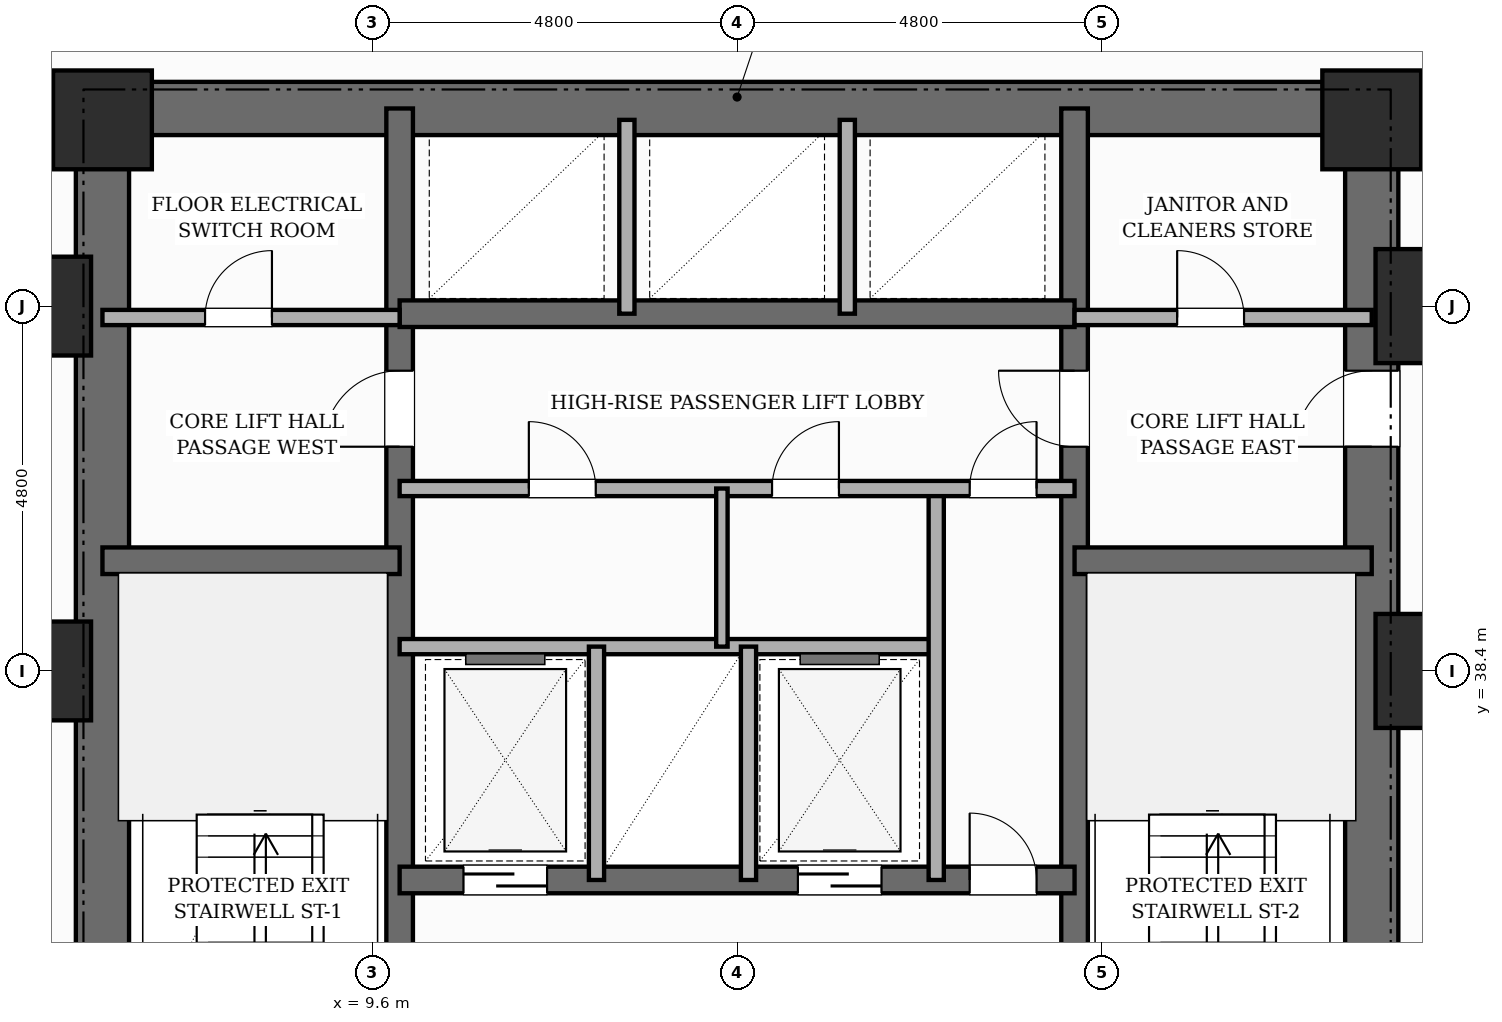
"""IFC4 building model, lengths in metres.
Left out: names, types, materials, properties, quantities, classifications, styles, units other than length and angle.
Written with IfcOpenShell. Run it as: python <this file> out.ifc"""

import sys

from ifc_helpers import new_model, si_unit, direction, frame, frame_2d, origin, origin_2d, place, context, subcontext, project, spatial, rectangle, extrude, element, fill, save


model = new_model("IFC4")
c1 = context("Model", 3, precision=1e-05, world=origin(), true_north=direction((0.0, 1.0)))
c2 = subcontext(c1, "Body", "Model", "MODEL_VIEW")
j1 = project(units=[si_unit("LENGTHUNIT", "METRE"), si_unit("PLANEANGLEUNIT", "RADIAN")], contexts=[c1])
p1 = place(None, origin())
s1 = spatial("IfcSite", under=j1, at=p1, CompositionType="ELEMENT")
p2 = place(p1, origin())
s2 = spatial("IfcBuilding", under=s1, at=p2, CompositionType="ELEMENT")
p3 = place(p2, frame((0.0, 0.0, 5.2)))
s3 = spatial("IfcBuildingStorey", under=s2, at=p3, CompositionType="ELEMENT", Elevation=5.2)
p4 = place(p3, frame((6.05, 30.55, 0.0), z_axis=(0.0, 0.0, 1.0), x_axis=(0.0, 1.0, 0.0)))
e1 = element("IfcWall", 1, at=p4, inside=s3, PredefinedType="SHEAR", context=c2, shape_type="SweptSolid", body=[
    extrude(rectangle(XDim=15.6, YDim=0.7, at=frame_2d((7.8, 0.0))), origin(), (0.0, 0.0, 1.0), 4.8),
])
p5 = place(p3, frame((22.75, 30.55, 0.0), z_axis=(0.0, 0.0, 1.0), x_axis=(0.0, 1.0, 0.0)))
e2 = element("IfcWall", 2, at=p5, inside=s3, PredefinedType="SHEAR", context=c2, shape_type="SweptSolid", body=[
    extrude(rectangle(XDim=15.6, YDim=0.7, at=frame_2d((7.8, 0.0))), origin(), (0.0, 0.0, 1.0), 4.8),
])
p6 = place(p5, frame((10.8, 0.0, 0.0)))
e3 = element("IfcOpeningElement", 3, at=p6, cuts=e2, PredefinedType="OPENING", context=c2, shape_type="SweptSolid", body=[
    extrude(rectangle(XDim=1.0, YDim=2.15, at=frame_2d((0.5, 1.075))), frame((0.0, 0.36, 0.0), z_axis=(0.0, -1.0, 0.0), x_axis=(1.0, 0.0, 0.0)), (0.0, 0.0, 1.0), 0.72),
])
p7 = place(p3, frame((6.05, 45.8, 0.0), z_axis=(0.0, 0.0, 1.0), x_axis=(1.0, 0.0, 0.0)))
e4 = element("IfcWall", 4, at=p7, inside=s3, PredefinedType="SHEAR", context=c2, shape_type="SweptSolid", body=[
    extrude(rectangle(XDim=16.7, YDim=0.7, at=frame_2d((8.35, 0.0))), origin(), (0.0, 0.0, 1.0), 4.8),
])
p8 = place(p3, frame((9.96, 30.9, 0.0), z_axis=(0.0, 0.0, 1.0), x_axis=(0.0, 1.0, 0.0)))
e5 = element("IfcWall", 5, at=p8, inside=s3, PredefinedType="SHEAR", context=c2, shape_type="SweptSolid", body=[
    extrude(rectangle(XDim=14.9, YDim=0.35, at=frame_2d((7.45, 0.0))), origin(), (0.0, 0.0, 1.0), 4.8),
])
p9 = place(p8, frame((0.65, 0.0, 0.0)))
e6 = element("IfcOpeningElement", 6, at=p9, cuts=e5, PredefinedType="OPENING", context=c2, shape_type="SweptSolid", body=[
    extrude(rectangle(XDim=0.95, YDim=2.1, at=frame_2d((0.475, 1.05))), frame((0.0, 0.185, 0.0), z_axis=(0.0, -1.0, 0.0), x_axis=(1.0, 0.0, 0.0)), (0.0, 0.0, 1.0), 0.37),
])
p10 = place(p8, frame((10.45, 0.0, 0.0)))
e7 = element("IfcOpeningElement", 7, at=p10, cuts=e5, PredefinedType="OPENING", context=c2, shape_type="SweptSolid", body=[
    extrude(rectangle(XDim=1.0, YDim=2.15, at=frame_2d((0.5, 1.075))), frame((0.0, 0.185, 0.0), z_axis=(0.0, -1.0, 0.0), x_axis=(1.0, 0.0, 0.0)), (0.0, 0.0, 1.0), 0.37),
])
p11 = place(p3, frame((18.84, 30.9, 0.0), z_axis=(0.0, 0.0, 1.0), x_axis=(0.0, 1.0, 0.0)))
e8 = element("IfcWall", 8, at=p11, inside=s3, PredefinedType="SHEAR", context=c2, shape_type="SweptSolid", body=[
    extrude(rectangle(XDim=14.9, YDim=0.35, at=frame_2d((7.45, 0.0))), origin(), (0.0, 0.0, 1.0), 4.8),
])
p12 = place(p11, frame((0.65, 0.0, 0.0)))
e9 = element("IfcOpeningElement", 9, at=p12, cuts=e8, PredefinedType="OPENING", context=c2, shape_type="SweptSolid", body=[
    extrude(rectangle(XDim=0.95, YDim=2.1, at=frame_2d((0.475, 1.05))), frame((0.0, 0.185, 0.0), z_axis=(0.0, -1.0, 0.0), x_axis=(1.0, 0.0, 0.0)), (0.0, 0.0, 1.0), 0.37),
])
p13 = place(p11, frame((10.45, 0.0, 0.0)))
e10 = element("IfcOpeningElement", 10, at=p13, cuts=e8, PredefinedType="OPENING", context=c2, shape_type="SweptSolid", body=[
    extrude(rectangle(XDim=1.0, YDim=2.15, at=frame_2d((0.5, 1.075))), frame((0.0, 0.185, 0.0), z_axis=(0.0, -1.0, 0.0), x_axis=(1.0, 0.0, 0.0)), (0.0, 0.0, 1.0), 0.37),
])
for number, where, z_axis, x_axis in (
    (11, (6.05, 39.85, 0.0), (0.0, 0.0, 1.0), (1.0, 0.0, 0.0)),
    (12, (18.84, 39.85, 0.0), (0.0, 0.0, 1.0), (1.0, 0.0, 0.0)),
):
    element("IfcWall", number, at=place(p3, frame(where, z_axis=z_axis, x_axis=x_axis)), inside=s3, PredefinedType="SHEAR", context=c2, shape_type="SweptSolid", body=[
        extrude(rectangle(XDim=3.91, YDim=0.35, at=frame_2d((1.955, 0.0))), origin(), (0.0, 0.0, 1.0), 4.8),
    ])
p14 = place(p3, frame((9.96, 35.65, 0.0), z_axis=(0.0, 0.0, 1.0), x_axis=(1.0, 0.0, 0.0)))
e13 = element("IfcWall", 13, at=p14, inside=s3, PredefinedType="SHEAR", context=c2, shape_type="SweptSolid", body=[
    extrude(rectangle(XDim=8.88, YDim=0.35, at=frame_2d((4.44, 0.0))), origin(), (0.0, 0.0, 1.0), 4.8),
])
p15 = place(p14, frame((0.84, 0.0, 0.0)))
e14 = element("IfcOpeningElement", 14, at=p15, cuts=e13, PredefinedType="OPENING", context=c2, shape_type="SweptSolid", body=[
    extrude(rectangle(XDim=1.1, YDim=2.15, at=frame_2d((0.55, 1.075))), frame((0.0, 0.185, 0.0), z_axis=(0.0, -1.0, 0.0), x_axis=(1.0, 0.0, 0.0)), (0.0, 0.0, 1.0), 0.37),
])
p16 = place(p14, frame((5.24, 0.0, 0.0)))
e15 = element("IfcOpeningElement", 15, at=p16, cuts=e13, PredefinedType="OPENING", context=c2, shape_type="SweptSolid", body=[
    extrude(rectangle(XDim=1.1, YDim=2.15, at=frame_2d((0.55, 1.075))), frame((0.0, 0.185, 0.0), z_axis=(0.0, -1.0, 0.0), x_axis=(1.0, 0.0, 0.0)), (0.0, 0.0, 1.0), 0.37),
])
p17 = place(p14, frame((7.5, 0.0, 0.0)))
e16 = element("IfcOpeningElement", 16, at=p17, cuts=e13, PredefinedType="OPENING", context=c2, shape_type="SweptSolid", body=[
    extrude(rectangle(XDim=0.88, YDim=2.1, at=frame_2d((0.44, 1.05))), frame((0.0, 0.185, 0.0), z_axis=(0.0, -1.0, 0.0), x_axis=(1.0, 0.0, 0.0)), (0.0, 0.0, 1.0), 0.37),
])
p18 = place(p3, frame((9.96, 43.1, 0.0), z_axis=(0.0, 0.0, 1.0), x_axis=(1.0, 0.0, 0.0)))
e17 = element("IfcWall", 17, at=p18, inside=s3, PredefinedType="SHEAR", context=c2, shape_type="SweptSolid", body=[
    extrude(rectangle(XDim=8.88, YDim=0.35, at=frame_2d((4.44, 0.0))), origin(), (0.0, 0.0, 1.0), 4.8),
])
for number, where, z_axis, x_axis in (
    (18, (5.25, 38.4, 0.0), (0.0, 0.0, 1.0), (1.0, 0.0, 0.0)),
    (19, (5.25, 43.2, 0.0), (0.0, 0.0, 1.0), (1.0, 0.0, 0.0)),
    (20, (6.05, 45.65, 0.0), (0.0, 0.0, 1.0), (1.0, 0.0, 0.0)),
    (21, (22.75, 45.65, 0.0), (0.0, 0.0, 1.0), (1.0, 0.0, 0.0)),
):
    element("IfcColumn", number, at=place(p3, frame(where, z_axis=z_axis, x_axis=x_axis)), inside=s3, PredefinedType="COLUMN", context=c2, shape_type="SweptSolid", body=[
        extrude(rectangle(XDim=1.3, YDim=1.3, at=origin_2d()), origin(), (0.0, 0.0, 1.0), 4.8),
    ])
for number, where, z_axis, x_axis in (
    (22, (23.55, 38.4, 0.0), (0.0, 0.0, 1.0), (1.0, 0.0, 0.0)),
    (23, (23.55, 43.2, 0.0), (0.0, 0.0, 1.0), (1.0, 0.0, 0.0)),
):
    element("IfcColumn", number, at=place(p3, frame(where, z_axis=z_axis, x_axis=x_axis)), inside=s3, PredefinedType="USERDEFINED", context=c2, shape_type="SweptSolid", body=[
        extrude(rectangle(XDim=1.5, YDim=1.5, at=origin_2d()), origin(), (0.0, 0.0, 1.0), 4.8),
    ])
p19 = place(p3, frame((9.96, 38.72, 0.0), z_axis=(0.0, 0.0, 1.0), x_axis=(1.0, 0.0, 0.0)))
e24 = element("IfcWall", 24, at=p19, inside=s3, PredefinedType="POLYGONAL", context=c2, shape_type="SweptSolid", body=[
    extrude(rectangle(XDim=7.06, YDim=0.2, at=frame_2d((3.53, 0.0))), origin(), (0.0, 0.0, 1.0), 4.52),
])
for number, where, z_axis, x_axis in (
    (25, (12.55, 35.65, 0.0), (0.0, 0.0, 1.0), (0.0, 1.0, 0.0)),
    (26, (14.55, 35.65, 0.0), (0.0, 0.0, 1.0), (0.0, 1.0, 0.0)),
):
    element("IfcWall", number, at=place(p3, frame(where, z_axis=z_axis, x_axis=x_axis)), inside=s3, PredefinedType="POLYGONAL", context=c2, shape_type="SweptSolid", body=[
        extrude(rectangle(XDim=3.07, YDim=0.2, at=frame_2d((1.535, 0.0))), origin(), (0.0, 0.0, 1.0), 4.52),
    ])
p20 = place(p3, frame((17.02, 35.65, 0.0), z_axis=(0.0, 0.0, 1.0), x_axis=(0.0, 1.0, 0.0)))
e27 = element("IfcWall", 27, at=p20, inside=s3, PredefinedType="POLYGONAL", context=c2, shape_type="SweptSolid", body=[
    extrude(rectangle(XDim=5.15, YDim=0.2, at=frame_2d((2.575, 0.0))), origin(), (0.0, 0.0, 1.0), 4.52),
])
p21 = place(p3, frame((9.96, 40.8, 0.0), z_axis=(0.0, 0.0, 1.0), x_axis=(1.0, 0.0, 0.0)))
e28 = element("IfcWall", 28, at=p21, inside=s3, PredefinedType="POLYGONAL", context=c2, shape_type="SweptSolid", body=[
    extrude(rectangle(XDim=8.88, YDim=0.2, at=frame_2d((4.44, 0.0))), origin(), (0.0, 0.0, 1.0), 4.52),
])
p22 = place(p21, frame((7.5, 0.0, 0.0)))
e29 = element("IfcOpeningElement", 29, at=p22, cuts=e28, PredefinedType="OPENING", context=c2, shape_type="SweptSolid", body=[
    extrude(rectangle(XDim=0.88, YDim=2.1, at=frame_2d((0.44, 1.05))), frame((0.0, 0.11, 0.0), z_axis=(0.0, -1.0, 0.0), x_axis=(1.0, 0.0, 0.0)), (0.0, 0.0, 1.0), 0.22),
])
p23 = place(p21, frame((1.7, 0.0, 0.0)))
e30 = element("IfcOpeningElement", 30, at=p23, cuts=e28, PredefinedType="OPENING", context=c2, shape_type="SweptSolid", body=[
    extrude(rectangle(XDim=0.88, YDim=2.1, at=frame_2d((0.44, 1.05))), frame((0.0, 0.11, 0.0), z_axis=(0.0, -1.0, 0.0), x_axis=(1.0, 0.0, 0.0)), (0.0, 0.0, 1.0), 0.22),
])
p24 = place(p21, frame((4.9, 0.0, 0.0)))
e31 = element("IfcOpeningElement", 31, at=p24, cuts=e28, PredefinedType="OPENING", context=c2, shape_type="SweptSolid", body=[
    extrude(rectangle(XDim=0.88, YDim=2.1, at=frame_2d((0.44, 1.05))), frame((0.0, 0.11, 0.0), z_axis=(0.0, -1.0, 0.0), x_axis=(1.0, 0.0, 0.0)), (0.0, 0.0, 1.0), 0.22),
])
p25 = place(p3, frame((18.84, 43.05, 0.0), z_axis=(0.0, 0.0, 1.0), x_axis=(1.0, 0.0, 0.0)))
e32 = element("IfcWall", 32, at=p25, inside=s3, PredefinedType="POLYGONAL", context=c2, shape_type="SweptSolid", body=[
    extrude(rectangle(XDim=3.91, YDim=0.2, at=frame_2d((1.955, 0.0))), origin(), (0.0, 0.0, 1.0), 3.6),
])
p26 = place(p25, frame((1.35, 0.0, 0.0)))
e33 = element("IfcOpeningElement", 33, at=p26, cuts=e32, PredefinedType="OPENING", context=c2, shape_type="SweptSolid", body=[
    extrude(rectangle(XDim=0.88, YDim=2.1, at=frame_2d((0.44, 1.05))), frame((0.0, 0.11, 0.0), z_axis=(0.0, -1.0, 0.0), x_axis=(1.0, 0.0, 0.0)), (0.0, 0.0, 1.0), 0.22),
])
p27 = place(p3, frame((6.05, 43.05, 0.0), z_axis=(0.0, 0.0, 1.0), x_axis=(1.0, 0.0, 0.0)))
e34 = element("IfcWall", 34, at=p27, inside=s3, PredefinedType="POLYGONAL", context=c2, shape_type="SweptSolid", body=[
    extrude(rectangle(XDim=3.91, YDim=0.2, at=frame_2d((1.955, 0.0))), origin(), (0.0, 0.0, 1.0), 3.6),
])
p28 = place(p27, frame((1.35, 0.0, 0.0)))
e35 = element("IfcOpeningElement", 35, at=p28, cuts=e34, PredefinedType="OPENING", context=c2, shape_type="SweptSolid", body=[
    extrude(rectangle(XDim=0.88, YDim=2.1, at=frame_2d((0.44, 1.05))), frame((0.0, 0.11, 0.0), z_axis=(0.0, -1.0, 0.0), x_axis=(1.0, 0.0, 0.0)), (0.0, 0.0, 1.0), 0.22),
])
for number, where, z_axis, x_axis in (
    (36, (12.95, 43.1, 0.0), (0.0, 0.0, 1.0), (0.0, 1.0, 0.0)),
    (37, (15.85, 43.1, 0.0), (0.0, 0.0, 1.0), (0.0, 1.0, 0.0)),
):
    element("IfcWall", number, at=place(p3, frame(where, z_axis=z_axis, x_axis=x_axis)), inside=s3, PredefinedType="POLYGONAL", context=c2, shape_type="SweptSolid", body=[
        extrude(rectangle(XDim=2.55, YDim=0.2, at=frame_2d((1.275, 0.0))), origin(), (0.0, 0.0, 1.0), 4.52),
    ])
p29 = place(p3, frame((14.2, 38.72, 0.0), z_axis=(0.0, 0.0, 1.0), x_axis=(0.0, 1.0, 0.0)))
e38 = element("IfcWall", 38, at=p29, inside=s3, PredefinedType="PARTITIONING", context=c2, shape_type="SweptSolid", body=[
    extrude(rectangle(XDim=2.08, YDim=0.15, at=frame_2d((1.04, 0.0))), origin(), (0.0, 0.0, 1.0), 4.52),
])
p30 = place(p15, origin())
e39 = element("IfcDoor", 39, at=p30, inside=s3, OperationType="SLIDING_TO_LEFT", PredefinedType="DOOR", context=c2, shape_type="SweptSolid", body=[
    extrude(rectangle(XDim=1.1, YDim=2.15, at=frame_2d((0.55, 1.075))), frame((0.0, 0.025, 0.0), z_axis=(0.0, -1.0, 0.0), x_axis=(1.0, 0.0, 0.0)), (0.0, 0.0, 1.0), 0.05),
])
fill(e14, e39)
p31 = place(p16, origin())
e40 = element("IfcDoor", 40, at=p31, inside=s3, OperationType="SLIDING_TO_RIGHT", PredefinedType="DOOR", context=c2, shape_type="SweptSolid", body=[
    extrude(rectangle(XDim=1.1, YDim=2.15, at=frame_2d((0.55, 1.075))), frame((0.0, 0.025, 0.0), z_axis=(0.0, -1.0, 0.0), x_axis=(1.0, 0.0, 0.0)), (0.0, 0.0, 1.0), 0.05),
])
fill(e15, e40)
p32 = place(p17, origin())
e41 = element("IfcDoor", 41, at=p32, inside=s3, OperationType="SINGLE_SWING_LEFT", PredefinedType="DOOR", context=c2, shape_type="SweptSolid", body=[
    extrude(rectangle(XDim=0.88, YDim=2.1, at=frame_2d((0.44, 1.05))), frame((0.0, 0.025, 0.0), z_axis=(0.0, -1.0, 0.0), x_axis=(1.0, 0.0, 0.0)), (0.0, 0.0, 1.0), 0.05),
])
fill(e16, e41)
p33 = place(p22, origin())
e42 = element("IfcDoor", 42, at=p33, inside=s3, OperationType="SINGLE_SWING_RIGHT", PredefinedType="DOOR", context=c2, shape_type="SweptSolid", body=[
    extrude(rectangle(XDim=0.88, YDim=2.1, at=frame_2d((0.44, 1.05))), frame((0.0, 0.025, 0.0), z_axis=(0.0, -1.0, 0.0), x_axis=(1.0, 0.0, 0.0)), (0.0, 0.0, 1.0), 0.05),
])
fill(e29, e42)
p34 = place(p10, origin())
e43 = element("IfcDoor", 43, at=p34, inside=s3, OperationType="SINGLE_SWING_LEFT", PredefinedType="DOOR", context=c2, shape_type="SweptSolid", body=[
    extrude(rectangle(XDim=1.0, YDim=2.15, at=frame_2d((0.5, 1.075))), frame((0.0, 0.025, 0.0), z_axis=(0.0, -1.0, 0.0), x_axis=(1.0, 0.0, 0.0)), (0.0, 0.0, 1.0), 0.05),
])
fill(e7, e43)
p35 = place(p13, origin())
e44 = element("IfcDoor", 44, at=p35, inside=s3, OperationType="SINGLE_SWING_RIGHT", PredefinedType="DOOR", context=c2, shape_type="SweptSolid", body=[
    extrude(rectangle(XDim=1.0, YDim=2.15, at=frame_2d((0.5, 1.075))), frame((0.0, 0.025, 0.0), z_axis=(0.0, -1.0, 0.0), x_axis=(1.0, 0.0, 0.0)), (0.0, 0.0, 1.0), 0.05),
])
fill(e10, e44)
p36 = place(p6, origin())
e45 = element("IfcDoor", 45, at=p36, inside=s3, OperationType="SINGLE_SWING_LEFT", PredefinedType="DOOR", context=c2, shape_type="SweptSolid", body=[
    extrude(rectangle(XDim=1.0, YDim=2.15, at=frame_2d((0.5, 1.075))), frame((0.0, 0.025, 0.0), z_axis=(0.0, -1.0, 0.0), x_axis=(1.0, 0.0, 0.0)), (0.0, 0.0, 1.0), 0.05),
])
fill(e3, e45)
p37 = place(p28, origin())
e46 = element("IfcDoor", 46, at=p37, inside=s3, OperationType="SINGLE_SWING_RIGHT", PredefinedType="DOOR", context=c2, shape_type="SweptSolid", body=[
    extrude(rectangle(XDim=0.88, YDim=2.1, at=frame_2d((0.44, 1.05))), frame((0.0, 0.025, 0.0), z_axis=(0.0, -1.0, 0.0), x_axis=(1.0, 0.0, 0.0)), (0.0, 0.0, 1.0), 0.05),
])
fill(e35, e46)
p38 = place(p23, origin())
e47 = element("IfcDoor", 47, at=p38, inside=s3, OperationType="SINGLE_SWING_LEFT", PredefinedType="DOOR", context=c2, shape_type="SweptSolid", body=[
    extrude(rectangle(XDim=0.88, YDim=2.1, at=frame_2d((0.44, 1.05))), frame((0.0, 0.025, 0.0), z_axis=(0.0, -1.0, 0.0), x_axis=(1.0, 0.0, 0.0)), (0.0, 0.0, 1.0), 0.05),
])
fill(e30, e47)
p39 = place(p24, origin())
e48 = element("IfcDoor", 48, at=p39, inside=s3, OperationType="SINGLE_SWING_RIGHT", PredefinedType="DOOR", context=c2, shape_type="SweptSolid", body=[
    extrude(rectangle(XDim=0.88, YDim=2.1, at=frame_2d((0.44, 1.05))), frame((0.0, 0.025, 0.0), z_axis=(0.0, -1.0, 0.0), x_axis=(1.0, 0.0, 0.0)), (0.0, 0.0, 1.0), 0.05),
])
fill(e31, e48)
p40 = place(p26, origin())
e49 = element("IfcDoor", 49, at=p40, inside=s3, OperationType="SINGLE_SWING_LEFT", PredefinedType="DOOR", context=c2, shape_type="SweptSolid", body=[
    extrude(rectangle(XDim=0.88, YDim=2.1, at=frame_2d((0.44, 1.05))), frame((0.0, 0.025, 0.0), z_axis=(0.0, -1.0, 0.0), x_axis=(1.0, 0.0, 0.0)), (0.0, 0.0, 1.0), 0.05),
])
fill(e33, e49)
save(model, sys.argv[1])
